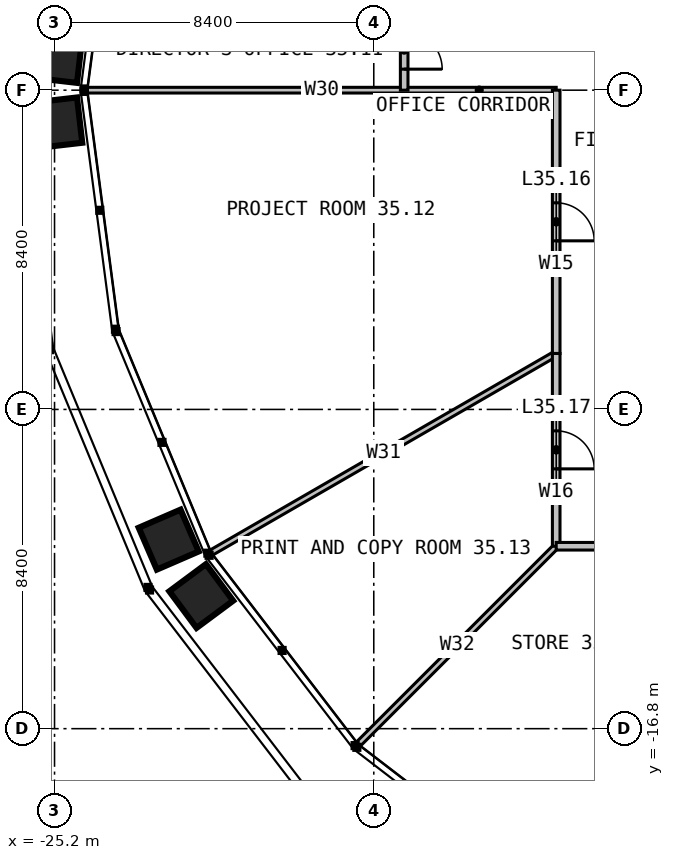
"""IFC4 building model, lengths in metres.
Left out: names, types, materials, properties, quantities, classifications, styles, units other than length and angle.
Written with IfcOpenShell. Run it as: python <this file> out.ifc"""

import sys

from ifc_helpers import new_model, si_unit, direction, frame, frame_2d, origin, place, context, subcontext, project, spatial, rectangle, extrude, element, fill, save


model = new_model("IFC4")
c1 = context("Model", 3, precision=1e-05, world=origin(), true_north=direction((0.0, 1.0)))
c2 = subcontext(c1, "Body", "Model", "MODEL_VIEW")
j1 = project(units=[si_unit("LENGTHUNIT", "METRE"), si_unit("PLANEANGLEUNIT", "RADIAN")], contexts=[c1])
p1 = place(None, origin())
s1 = spatial("IfcSite", under=j1, at=p1, CompositionType="ELEMENT")
p2 = place(p1, origin())
s2 = spatial("IfcBuilding", under=s1, at=p2, CompositionType="ELEMENT")
p3 = place(p2, frame((0.0, 0.0, 146.0)))
s3 = spatial("IfcBuildingStorey", under=s2, at=p3, CompositionType="ELEMENT", Elevation=146.0)
p4 = place(p3, frame((-12.0, 0.0, 0.0), z_axis=(0.0, 0.0, 1.0), x_axis=(-1.0, 0.0, 0.0)))
e1 = element("IfcWall", 1, at=p4, inside=s3, PredefinedType="PARTITIONING", context=c2, shape_type="SweptSolid", body=[
    extrude(rectangle(XDim=12.334, YDim=0.15, at=frame_2d((6.167, 0.0))), origin(), (0.0, 0.0, 1.0), 2.79),
])
p5 = place(p3, frame((-12.0, -6.928, 0.0), z_axis=(0.0, 0.0, 1.0), x_axis=(-0.866029212144, -0.49999340367, 0.0)))
e2 = element("IfcWall", 2, at=p5, inside=s3, PredefinedType="PARTITIONING", context=c2, shape_type="SweptSolid", body=[
    extrude(rectangle(XDim=10.478, YDim=0.15, at=frame_2d((5.239, 0.0))), origin(), (0.0, 0.0, 1.0), 2.79),
])
p6 = place(p3, frame((-12.0, -12.0, 0.0), z_axis=(0.0, 0.0, 1.0), x_axis=(-0.707106781187, -0.707106781187, 0.0)))
e3 = element("IfcWall", 3, at=p6, inside=s3, PredefinedType="PARTITIONING", context=c2, shape_type="SweptSolid", body=[
    extrude(rectangle(XDim=7.364, YDim=0.15, at=frame_2d((3.682, 0.0))), origin(), (0.0, 0.0, 1.0), 2.79),
])
p7 = place(p3, frame((-6.928, -12.0, 0.0), z_axis=(0.0, 0.0, 1.0), x_axis=(-0.49999340367, -0.866029212144, 0.0)))
e4 = element("IfcWall", 4, at=p7, inside=s3, PredefinedType="PARTITIONING", context=c2, shape_type="SweptSolid", body=[
    extrude(rectangle(XDim=10.478, YDim=0.15, at=frame_2d((5.239, 0.0))), origin(), (0.0, 0.0, 1.0), 2.79),
])
p8 = place(p3, frame((-16.0, 9.238, 0.0), z_axis=(0.0, 0.0, 1.0), x_axis=(0.0, -1.0, 0.0)))
e5 = element("IfcWall", 5, at=p8, inside=s3, PredefinedType="PARTITIONING", context=c2, shape_type="SweptSolid", body=[
    extrude(rectangle(XDim=9.238, YDim=0.2, at=frame_2d((4.619, 0.0))), origin(), (0.0, 0.0, 1.0), 3.8),
])
p9 = place(p8, frame((3.066, 0.0, 0.0)))
e6 = element("IfcOpeningElement", 6, at=p9, cuts=e5, PredefinedType="OPENING", context=c2, shape_type="SweptSolid", body=[
    extrude(rectangle(XDim=1.0, YDim=2.2, at=frame_2d((0.5, 1.1))), frame((0.0, 0.11, 0.0), z_axis=(0.0, -1.0, 0.0), x_axis=(1.0, 0.0, 0.0)), (0.0, 0.0, 1.0), 0.22),
])
p10 = place(p8, frame((7.684, 0.0, 0.0)))
e7 = element("IfcOpeningElement", 7, at=p10, cuts=e5, PredefinedType="OPENING", context=c2, shape_type="SweptSolid", body=[
    extrude(rectangle(XDim=1.0, YDim=2.2, at=frame_2d((0.5, 1.1))), frame((0.0, 0.11, 0.0), z_axis=(0.0, -1.0, 0.0), x_axis=(1.0, 0.0, 0.0)), (0.0, 0.0, 1.0), 0.22),
])
p11 = place(p3, frame((-12.0, 0.0, 0.0), z_axis=(0.0, 0.0, 1.0), x_axis=(0.0, -1.0, 0.0)))
e8 = element("IfcWall", 8, at=p11, inside=s3, PredefinedType="PARTITIONING", context=c2, shape_type="SweptSolid", body=[
    extrude(rectangle(XDim=6.928, YDim=0.2, at=frame_2d((3.464, 0.0))), origin(), (0.0, 0.0, 1.0), 3.8),
])
p12 = place(p11, frame((2.964, 0.0, 0.0)))
e9 = element("IfcOpeningElement", 9, at=p12, cuts=e8, PredefinedType="OPENING", context=c2, shape_type="SweptSolid", body=[
    extrude(rectangle(XDim=1.0, YDim=2.2, at=frame_2d((0.5, 1.1))), frame((0.0, 0.11, 0.0), z_axis=(0.0, -1.0, 0.0), x_axis=(1.0, 0.0, 0.0)), (0.0, 0.0, 1.0), 0.22),
])
p13 = place(p3, frame((-12.0, -6.928, 0.0), z_axis=(0.0, 0.0, 1.0), x_axis=(0.0, -1.0, 0.0)))
e10 = element("IfcWall", 10, at=p13, inside=s3, PredefinedType="PARTITIONING", context=c2, shape_type="SweptSolid", body=[
    extrude(rectangle(XDim=5.072, YDim=0.2, at=frame_2d((2.536, 0.0))), origin(), (0.0, 0.0, 1.0), 3.8),
])
p14 = place(p13, frame((2.036, 0.0, 0.0)))
e11 = element("IfcOpeningElement", 11, at=p14, cuts=e10, PredefinedType="OPENING", context=c2, shape_type="SweptSolid", body=[
    extrude(rectangle(XDim=1.0, YDim=2.2, at=frame_2d((0.5, 1.1))), frame((0.0, 0.11, 0.0), z_axis=(0.0, -1.0, 0.0), x_axis=(1.0, 0.0, 0.0)), (0.0, 0.0, 1.0), 0.22),
])
p15 = place(p3, frame((-12.0, -12.0, 0.0), z_axis=(0.0, 0.0, 1.0), x_axis=(1.0, 0.0, 0.0)))
e12 = element("IfcWall", 12, at=p15, inside=s3, PredefinedType="PARTITIONING", context=c2, shape_type="SweptSolid", body=[
    extrude(rectangle(XDim=5.072, YDim=0.2, at=frame_2d((2.536, 0.0))), origin(), (0.0, 0.0, 1.0), 3.8),
])
p16 = place(p15, frame((2.036, 0.0, 0.0)))
e13 = element("IfcOpeningElement", 13, at=p16, cuts=e12, PredefinedType="OPENING", context=c2, shape_type="SweptSolid", body=[
    extrude(rectangle(XDim=1.0, YDim=2.2, at=frame_2d((0.5, 1.1))), frame((0.0, 0.11, 0.0), z_axis=(0.0, -1.0, 0.0), x_axis=(1.0, 0.0, 0.0)), (0.0, 0.0, 1.0), 0.22),
])
p17 = place(p10, origin())
e14 = element("IfcDoor", 14, at=p17, inside=s3, OperationType="SINGLE_SWING_RIGHT", PredefinedType="DOOR", context=c2, shape_type="SweptSolid", body=[
    extrude(rectangle(XDim=1.0, YDim=2.2, at=frame_2d((0.5, 1.1))), frame((0.0, 0.025, 0.0), z_axis=(0.0, -1.0, 0.0), x_axis=(1.0, 0.0, 0.0)), (0.0, 0.0, 1.0), 0.05),
])
fill(e7, e14)
p18 = place(p12, origin())
e15 = element("IfcDoor", 15, at=p18, inside=s3, OperationType="SINGLE_SWING_RIGHT", PredefinedType="DOOR", context=c2, shape_type="SweptSolid", body=[
    extrude(rectangle(XDim=1.0, YDim=2.2, at=frame_2d((0.5, 1.1))), frame((0.0, 0.025, 0.0), z_axis=(0.0, -1.0, 0.0), x_axis=(1.0, 0.0, 0.0)), (0.0, 0.0, 1.0), 0.05),
])
fill(e9, e15)
p19 = place(p14, origin())
e16 = element("IfcDoor", 16, at=p19, inside=s3, OperationType="SINGLE_SWING_RIGHT", PredefinedType="DOOR", context=c2, shape_type="SweptSolid", body=[
    extrude(rectangle(XDim=1.0, YDim=2.2, at=frame_2d((0.5, 1.1))), frame((0.0, 0.025, 0.0), z_axis=(0.0, -1.0, 0.0), x_axis=(1.0, 0.0, 0.0)), (0.0, 0.0, 1.0), 0.05),
])
fill(e11, e16)
save(model, sys.argv[1])
